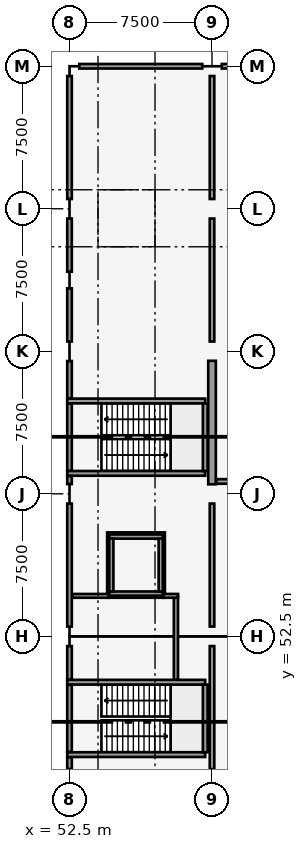
"""IFC4 building model, lengths in metres.
Left out: names, types, materials, properties, quantities, classifications, styles, units other than length and angle.
Written with IfcOpenShell. Run it as: python <this file> out.ifc"""

import sys

from ifc_helpers import new_model, si_unit, direction, frame, frame_2d, origin, origin_2d, place, context, subcontext, project, spatial, rectangle, extrude, element, fill, save


model = new_model("IFC4")
c1 = context("Model", 3, precision=1e-05, world=origin(), true_north=direction((0.0, 1.0)))
c2 = subcontext(c1, "Body", "Model", "MODEL_VIEW")
j1 = project(units=[si_unit("LENGTHUNIT", "METRE"), si_unit("PLANEANGLEUNIT", "RADIAN")], contexts=[c1])
p1 = place(None, origin())
s1 = spatial("IfcSite", under=j1, at=p1, CompositionType="ELEMENT")
p2 = place(p1, origin())
s2 = spatial("IfcBuilding", under=s1, at=p2, CompositionType="ELEMENT")
p3 = place(p2, frame((0.0, 0.0, -4.8)))
s3 = spatial("IfcBuildingStorey", under=s2, at=p3, CompositionType="ELEMENT", Elevation=-4.8)
for number, where, z_axis, x_axis in (
    (1, (52.5, 52.5, 0.0), (0.0, 0.0, 1.0), (1.0, 0.0, 0.0)),
    (2, (52.5, 60.0, 0.0), (0.0, 0.0, 1.0), (1.0, 0.0, 0.0)),
    (3, (52.5, 67.5, 0.0), (0.0, 0.0, 1.0), (1.0, 0.0, 0.0)),
    (4, (52.5, 75.0, 0.0), (0.0, 0.0, 1.0), (1.0, 0.0, 0.0)),
    (5, (52.5, 82.5, 0.0), (0.0, 0.0, 1.0), (1.0, 0.0, 0.0)),
    (6, (60.0, 52.5, 0.0), (0.0, 0.0, 1.0), (1.0, 0.0, 0.0)),
    (7, (60.0, 60.0, 0.0), (0.0, 0.0, 1.0), (1.0, 0.0, 0.0)),
    (8, (60.0, 67.5, 0.0), (0.0, 0.0, 1.0), (1.0, 0.0, 0.0)),
    (9, (60.0, 75.0, 0.0), (0.0, 0.0, 1.0), (1.0, 0.0, 0.0)),
    (10, (60.0, 82.5, 0.0), (0.0, 0.0, 1.0), (1.0, 0.0, 0.0)),
):
    element("IfcColumn", number, at=place(p3, frame(where, z_axis=z_axis, x_axis=x_axis)), inside=s3, PredefinedType="COLUMN", context=c2, shape_type="SweptSolid", body=[
        extrude(rectangle(XDim=1.0, YDim=1.0, at=origin_2d()), origin(), (0.0, 0.0, 1.0), 4.8),
    ])
p4 = place(p3, frame((52.5, 71.25, 0.0), z_axis=(0.0, 0.0, 1.0), x_axis=(1.0, 0.0, 0.0)))
e11 = element("IfcColumn", 11, at=p4, inside=s3, PredefinedType="PILASTER", context=c2, shape_type="SweptSolid", body=[
    extrude(rectangle(XDim=0.45, YDim=0.85, at=origin_2d()), origin(), (0.0, 0.0, 1.0), 4.8),
])
p5 = place(p3, frame((60.0, 60.5, 0.0), z_axis=(0.0, 0.0, 1.0), x_axis=(0.0, 1.0, 0.0)))
e12 = element("IfcWall", 12, at=p5, inside=s3, PredefinedType="SHEAR", context=c2, shape_type="SweptSolid", body=[
    extrude(rectangle(XDim=6.5, YDim=0.4, at=frame_2d((3.25, 0.0))), origin(), (0.0, 0.0, 1.0), 2.7),
])
p6 = place(p3, frame((52.38, 46.275, 0.0), z_axis=(0.0, 0.0, 1.0), x_axis=(1.0, 0.0, 0.0)))
e13 = element("IfcWall", 13, at=p6, inside=s3, PredefinedType="SOLIDWALL", context=c2, shape_type="SweptSolid", body=[
    extrude(rectangle(XDim=7.26, YDim=0.25, at=frame_2d((3.63, 0.0))), origin(), (0.0, 0.0, 1.0), 4.5),
])
p7 = place(p6, frame((0.62, 0.0, 0.0)))
e14 = element("IfcOpeningElement", 14, at=p7, cuts=e13, PredefinedType="OPENING", context=c2, shape_type="SweptSolid", body=[
    extrude(rectangle(XDim=1.1, YDim=2.15, at=frame_2d((0.55, 1.075))), frame((0.0, 0.135, 0.0), z_axis=(0.0, -1.0, 0.0), x_axis=(1.0, 0.0, 0.0)), (0.0, 0.0, 1.0), 0.27),
])
p8 = place(p3, frame((52.38, 50.085, 0.0), z_axis=(0.0, 0.0, 1.0), x_axis=(1.0, 0.0, 0.0)))
e15 = element("IfcWall", 15, at=p8, inside=s3, PredefinedType="SOLIDWALL", context=c2, shape_type="SweptSolid", body=[
    extrude(rectangle(XDim=7.26, YDim=0.25, at=frame_2d((3.63, 0.0))), origin(), (0.0, 0.0, 1.0), 4.5),
])
p9 = place(p8, frame((0.62, 0.0, 0.0)))
e16 = element("IfcOpeningElement", 16, at=p9, cuts=e15, PredefinedType="OPENING", context=c2, shape_type="SweptSolid", body=[
    extrude(rectangle(XDim=1.1, YDim=2.15, at=frame_2d((0.55, 1.075))), frame((0.0, 0.135, 0.0), z_axis=(0.0, -1.0, 0.0), x_axis=(1.0, 0.0, 0.0)), (0.0, 0.0, 1.0), 0.27),
])
p10 = place(p3, frame((59.645, 46.4, 0.0), z_axis=(0.0, 0.0, 1.0), x_axis=(0.0, 1.0, 0.0)))
e17 = element("IfcWall", 17, at=p10, inside=s3, PredefinedType="SOLIDWALL", context=c2, shape_type="SweptSolid", body=[
    extrude(rectangle(XDim=3.56, YDim=0.25, at=frame_2d((1.78, 0.0))), origin(), (0.0, 0.0, 1.0), 4.5),
])
p11 = place(p3, frame((52.38, 61.075, 0.0), z_axis=(0.0, 0.0, 1.0), x_axis=(1.0, 0.0, 0.0)))
e18 = element("IfcWall", 18, at=p11, inside=s3, PredefinedType="SOLIDWALL", context=c2, shape_type="SweptSolid", body=[
    extrude(rectangle(XDim=7.26, YDim=0.25, at=frame_2d((3.63, 0.0))), origin(), (0.0, 0.0, 1.0), 4.5),
])
p12 = place(p11, frame((0.62, 0.0, 0.0)))
e19 = element("IfcOpeningElement", 19, at=p12, cuts=e18, PredefinedType="OPENING", context=c2, shape_type="SweptSolid", body=[
    extrude(rectangle(XDim=1.1, YDim=2.15, at=frame_2d((0.55, 1.075))), frame((0.0, 0.135, 0.0), z_axis=(0.0, -1.0, 0.0), x_axis=(1.0, 0.0, 0.0)), (0.0, 0.0, 1.0), 0.27),
])
p13 = place(p3, frame((52.38, 64.885, 0.0), z_axis=(0.0, 0.0, 1.0), x_axis=(1.0, 0.0, 0.0)))
e20 = element("IfcWall", 20, at=p13, inside=s3, PredefinedType="SOLIDWALL", context=c2, shape_type="SweptSolid", body=[
    extrude(rectangle(XDim=7.26, YDim=0.25, at=frame_2d((3.63, 0.0))), origin(), (0.0, 0.0, 1.0), 4.5),
])
p14 = place(p13, frame((0.62, 0.0, 0.0)))
e21 = element("IfcOpeningElement", 21, at=p14, cuts=e20, PredefinedType="OPENING", context=c2, shape_type="SweptSolid", body=[
    extrude(rectangle(XDim=1.1, YDim=2.15, at=frame_2d((0.55, 1.075))), frame((0.0, 0.135, 0.0), z_axis=(0.0, -1.0, 0.0), x_axis=(1.0, 0.0, 0.0)), (0.0, 0.0, 1.0), 0.27),
])
p15 = place(p3, frame((59.645, 61.2, 0.0), z_axis=(0.0, 0.0, 1.0), x_axis=(0.0, 1.0, 0.0)))
e22 = element("IfcWall", 22, at=p15, inside=s3, PredefinedType="SOLIDWALL", context=c2, shape_type="SweptSolid", body=[
    extrude(rectangle(XDim=3.56, YDim=0.25, at=frame_2d((1.78, 0.0))), origin(), (0.0, 0.0, 1.0), 4.5),
])
p16 = place(p3, frame((54.59, 54.75, 0.0), z_axis=(0.0, 0.0, 1.0), x_axis=(1.0, 0.0, 0.0)))
e23 = element("IfcWall", 23, at=p16, inside=s3, PredefinedType="SOLIDWALL", context=c2, shape_type="SweptSolid", body=[
    extrude(rectangle(XDim=2.82, YDim=0.22, at=frame_2d((1.41, 0.0))), origin(), (0.0, 0.0, 1.0), 4.5),
])
p17 = place(p16, frame((0.86, 0.0, 0.0)))
e24 = element("IfcOpeningElement", 24, at=p17, cuts=e23, PredefinedType="OPENING", context=c2, shape_type="SweptSolid", body=[
    extrude(rectangle(XDim=1.1, YDim=2.15, at=frame_2d((0.55, 1.075))), frame((0.0, 0.12, 0.0), z_axis=(0.0, -1.0, 0.0), x_axis=(1.0, 0.0, 0.0)), (0.0, 0.0, 1.0), 0.24),
])
p18 = place(p3, frame((54.59, 57.75, 0.0), z_axis=(0.0, 0.0, 1.0), x_axis=(1.0, 0.0, 0.0)))
e25 = element("IfcWall", 25, at=p18, inside=s3, PredefinedType="SOLIDWALL", context=c2, shape_type="SweptSolid", body=[
    extrude(rectangle(XDim=2.82, YDim=0.22, at=frame_2d((1.41, 0.0))), origin(), (0.0, 0.0, 1.0), 4.5),
])
for number, where, z_axis, x_axis in (
    (26, (54.7, 54.86, 0.0), (0.0, 0.0, 1.0), (0.0, 1.0, 0.0)),
    (27, (57.3, 54.86, 0.0), (0.0, 0.0, 1.0), (0.0, 1.0, 0.0)),
):
    element("IfcWall", number, at=place(p3, frame(where, z_axis=z_axis, x_axis=x_axis)), inside=s3, PredefinedType="SOLIDWALL", context=c2, shape_type="SweptSolid", body=[
        extrude(rectangle(XDim=2.78, YDim=0.22, at=frame_2d((1.39, 0.0))), origin(), (0.0, 0.0, 1.0), 4.5),
    ])
p19 = place(p3, frame((58.1, 50.22, 0.0), z_axis=(0.0, 0.0, 1.0), x_axis=(0.0, 1.0, 0.0)))
e28 = element("IfcWall", 28, at=p19, inside=s3, PredefinedType="SOLIDWALL", context=c2, shape_type="SweptSolid", body=[
    extrude(rectangle(XDim=4.41, YDim=0.22, at=frame_2d((2.205, 0.0))), origin(), (0.0, 0.0, 1.0), 4.5),
])
p20 = place(p19, frame((0.45, 0.0, 0.0)))
e29 = element("IfcOpeningElement", 29, at=p20, cuts=e28, PredefinedType="OPENING", context=c2, shape_type="SweptSolid", body=[
    extrude(rectangle(XDim=1.1, YDim=2.15, at=frame_2d((0.55, 1.075))), frame((0.0, 0.12, 0.0), z_axis=(0.0, -1.0, 0.0), x_axis=(1.0, 0.0, 0.0)), (0.0, 0.0, 1.0), 0.24),
])
p21 = place(p3, frame((52.64, 54.63, 0.0), z_axis=(0.0, 0.0, 1.0), x_axis=(1.0, 0.0, 0.0)))
e30 = element("IfcWall", 30, at=p21, inside=s3, PredefinedType="PARTITIONING", context=c2, shape_type="SweptSolid", body=[
    extrude(rectangle(XDim=1.935, YDim=0.2, at=frame_2d((0.968, 0.0))), origin(), (0.0, 0.0, 1.0), 4.48),
])
p22 = place(p3, frame((57.425, 54.63, 0.0), z_axis=(0.0, 0.0, 1.0), x_axis=(1.0, 0.0, 0.0)))
e31 = element("IfcWall", 31, at=p22, inside=s3, PredefinedType="PARTITIONING", context=c2, shape_type="SweptSolid", body=[
    extrude(rectangle(XDim=0.785, YDim=0.2, at=frame_2d((0.393, 0.0))), origin(), (0.0, 0.0, 1.0), 4.48),
])
p23 = place(p3, frame((53.014, 82.5, 0.0), z_axis=(0.0, 0.0, 1.0), x_axis=(1.0, 0.0, 0.0)))
e32 = element("IfcWall", 32, at=p23, inside=s3, PredefinedType="PARTITIONING", context=c2, shape_type="SweptSolid", body=[
    extrude(rectangle(XDim=6.472, YDim=0.24, at=frame_2d((3.236, 0.0))), origin(), (0.0, 0.0, 1.0), 3.87),
])
p24 = place(p3, frame((60.514, 82.5, 0.0), z_axis=(0.0, 0.0, 1.0), x_axis=(1.0, 0.0, 0.0)))
e33 = element("IfcWall", 33, at=p24, inside=s3, PredefinedType="PARTITIONING", context=c2, shape_type="SweptSolid", body=[
    extrude(rectangle(XDim=6.522, YDim=0.24, at=frame_2d((3.261, 0.0))), origin(), (0.0, 0.0, 1.0), 3.87),
])
p25 = place(p3, frame((52.5, 45.514, 0.0), z_axis=(0.0, 0.0, 1.0), x_axis=(0.0, 1.0, 0.0)))
e34 = element("IfcWall", 34, at=p25, inside=s3, PredefinedType="PARTITIONING", context=c2, shape_type="SweptSolid", body=[
    extrude(rectangle(XDim=0.622, YDim=0.24, at=frame_2d((0.311, 0.0))), origin(), (0.0, 0.0, 1.0), 3.42),
])
p26 = place(p3, frame((52.5, 46.414, 0.0), z_axis=(0.0, 0.0, 1.0), x_axis=(0.0, 1.0, 0.0)))
e35 = element("IfcWall", 35, at=p26, inside=s3, PredefinedType="PARTITIONING", context=c2, shape_type="SweptSolid", body=[
    extrude(rectangle(XDim=3.532, YDim=0.24, at=frame_2d((1.766, 0.0))), origin(), (0.0, 0.0, 1.0), 3.87),
])
p27 = place(p3, frame((52.5, 50.224, 0.0), z_axis=(0.0, 0.0, 1.0), x_axis=(0.0, 1.0, 0.0)))
e36 = element("IfcWall", 36, at=p27, inside=s3, PredefinedType="PARTITIONING", context=c2, shape_type="SweptSolid", body=[
    extrude(rectangle(XDim=1.762, YDim=0.24, at=frame_2d((0.881, 0.0))), origin(), (0.0, 0.0, 1.0), 3.42),
])
p28 = place(p3, frame((52.5, 53.014, 0.0), z_axis=(0.0, 0.0, 1.0), x_axis=(0.0, 1.0, 0.0)))
e37 = element("IfcWall", 37, at=p28, inside=s3, PredefinedType="PARTITIONING", context=c2, shape_type="SweptSolid", body=[
    extrude(rectangle(XDim=6.472, YDim=0.24, at=frame_2d((3.236, 0.0))), origin(), (0.0, 0.0, 1.0), 3.42),
])
p29 = place(p3, frame((52.5, 60.514, 0.0), z_axis=(0.0, 0.0, 1.0), x_axis=(0.0, 1.0, 0.0)))
e38 = element("IfcWall", 38, at=p29, inside=s3, PredefinedType="PARTITIONING", context=c2, shape_type="SweptSolid", body=[
    extrude(rectangle(XDim=0.422, YDim=0.24, at=frame_2d((0.211, 0.0))), origin(), (0.0, 0.0, 1.0), 3.42),
])
p30 = place(p3, frame((52.5, 61.214, 0.0), z_axis=(0.0, 0.0, 1.0), x_axis=(0.0, 1.0, 0.0)))
e39 = element("IfcWall", 39, at=p30, inside=s3, PredefinedType="PARTITIONING", context=c2, shape_type="SweptSolid", body=[
    extrude(rectangle(XDim=3.532, YDim=0.24, at=frame_2d((1.766, 0.0))), origin(), (0.0, 0.0, 1.0), 3.87),
])
p31 = place(p3, frame((52.5, 65.024, 0.0), z_axis=(0.0, 0.0, 1.0), x_axis=(0.0, 1.0, 0.0)))
e40 = element("IfcWall", 40, at=p31, inside=s3, PredefinedType="PARTITIONING", context=c2, shape_type="SweptSolid", body=[
    extrude(rectangle(XDim=1.962, YDim=0.24, at=frame_2d((0.981, 0.0))), origin(), (0.0, 0.0, 1.0), 3.42),
])
for number, where, z_axis, x_axis in (
    (41, (52.5, 68.014, 0.0), (0.0, 0.0, 1.0), (0.0, 1.0, 0.0)),
    (42, (52.5, 71.689, 0.0), (0.0, 0.0, 1.0), (0.0, 1.0, 0.0)),
):
    element("IfcWall", number, at=place(p3, frame(where, z_axis=z_axis, x_axis=x_axis)), inside=s3, PredefinedType="PARTITIONING", context=c2, shape_type="SweptSolid", body=[
        extrude(rectangle(XDim=2.797, YDim=0.24, at=frame_2d((1.398, 0.0))), origin(), (0.0, 0.0, 1.0), 3.42),
    ])
p32 = place(p3, frame((52.5, 75.514, 0.0), z_axis=(0.0, 0.0, 1.0), x_axis=(0.0, 1.0, 0.0)))
e43 = element("IfcWall", 43, at=p32, inside=s3, PredefinedType="PARTITIONING", context=c2, shape_type="SweptSolid", body=[
    extrude(rectangle(XDim=6.472, YDim=0.24, at=frame_2d((3.236, 0.0))), origin(), (0.0, 0.0, 1.0), 3.42),
])
p33 = place(p3, frame((60.0, 45.514, 0.0), z_axis=(0.0, 0.0, 1.0), x_axis=(0.0, 1.0, 0.0)))
e44 = element("IfcWall", 44, at=p33, inside=s3, PredefinedType="PARTITIONING", context=c2, shape_type="SweptSolid", body=[
    extrude(rectangle(XDim=6.472, YDim=0.24, at=frame_2d((3.236, 0.0))), origin(), (0.0, 0.0, 1.0), 2.67),
])
p34 = place(p3, frame((60.0, 53.014, 0.0), z_axis=(0.0, 0.0, 1.0), x_axis=(0.0, 1.0, 0.0)))
e45 = element("IfcWall", 45, at=p34, inside=s3, PredefinedType="PARTITIONING", context=c2, shape_type="SweptSolid", body=[
    extrude(rectangle(XDim=6.472, YDim=0.24, at=frame_2d((3.236, 0.0))), origin(), (0.0, 0.0, 1.0), 2.67),
])
p35 = place(p34, frame((2.436, 0.0, 0.0)))
e46 = element("IfcOpeningElement", 46, at=p35, cuts=e45, PredefinedType="OPENING", context=c2, shape_type="SweptSolid", body=[
    extrude(rectangle(XDim=1.6, YDim=2.15, at=frame_2d((0.8, 1.075))), frame((0.0, 0.13, 0.0), z_axis=(0.0, -1.0, 0.0), x_axis=(1.0, 0.0, 0.0)), (0.0, 0.0, 1.0), 0.26),
])
p36 = place(p3, frame((60.0, 68.014, 0.0), z_axis=(0.0, 0.0, 1.0), x_axis=(0.0, 1.0, 0.0)))
e47 = element("IfcWall", 47, at=p36, inside=s3, PredefinedType="PARTITIONING", context=c2, shape_type="SweptSolid", body=[
    extrude(rectangle(XDim=6.472, YDim=0.24, at=frame_2d((3.236, 0.0))), origin(), (0.0, 0.0, 1.0), 2.67),
])
p37 = place(p36, frame((2.436, 0.0, 0.0)))
e48 = element("IfcOpeningElement", 48, at=p37, cuts=e47, PredefinedType="OPENING", context=c2, shape_type="SweptSolid", body=[
    extrude(rectangle(XDim=1.6, YDim=2.15, at=frame_2d((0.8, 1.075))), frame((0.0, 0.13, 0.0), z_axis=(0.0, -1.0, 0.0), x_axis=(1.0, 0.0, 0.0)), (0.0, 0.0, 1.0), 0.26),
])
p38 = place(p3, frame((60.0, 75.514, 0.0), z_axis=(0.0, 0.0, 1.0), x_axis=(0.0, 1.0, 0.0)))
e49 = element("IfcWall", 49, at=p38, inside=s3, PredefinedType="PARTITIONING", context=c2, shape_type="SweptSolid", body=[
    extrude(rectangle(XDim=6.472, YDim=0.24, at=frame_2d((3.236, 0.0))), origin(), (0.0, 0.0, 1.0), 3.42),
])
p39 = place(p3, frame((60.214, 60.65, 0.0), z_axis=(0.0, 0.0, 1.0), x_axis=(1.0, 0.0, 0.0)))
e50 = element("IfcWall", 50, at=p39, inside=s3, PredefinedType="PARTITIONING", context=c2, shape_type="SweptSolid", body=[
    extrude(rectangle(XDim=37.072, YDim=0.24, at=frame_2d((18.536, 0.0))), origin(), (0.0, 0.0, 1.0), 2.67),
])
p40 = place(p7, origin())
e51 = element("IfcDoor", 51, at=p40, inside=s3, OperationType="SINGLE_SWING_LEFT", PredefinedType="DOOR", context=c2, shape_type="SweptSolid", body=[
    extrude(rectangle(XDim=1.1, YDim=2.15, at=frame_2d((0.55, 1.075))), frame((0.0, 0.025, 0.0), z_axis=(0.0, -1.0, 0.0), x_axis=(1.0, 0.0, 0.0)), (0.0, 0.0, 1.0), 0.05),
])
fill(e14, e51)
p41 = place(p9, frame((1.1, 0.0, 0.0), z_axis=(0.0, 0.0, 1.0), x_axis=(-1.0, 0.0, 0.0)))
e52 = element("IfcDoor", 52, at=p41, inside=s3, OperationType="SINGLE_SWING_RIGHT", PredefinedType="DOOR", context=c2, shape_type="SweptSolid", body=[
    extrude(rectangle(XDim=1.1, YDim=2.15, at=frame_2d((0.55, 1.075))), frame((0.0, 0.025, 0.0), z_axis=(0.0, -1.0, 0.0), x_axis=(1.0, 0.0, 0.0)), (0.0, 0.0, 1.0), 0.05),
])
fill(e16, e52)
p42 = place(p12, origin())
e53 = element("IfcDoor", 53, at=p42, inside=s3, OperationType="SINGLE_SWING_LEFT", PredefinedType="DOOR", context=c2, shape_type="SweptSolid", body=[
    extrude(rectangle(XDim=1.1, YDim=2.15, at=frame_2d((0.55, 1.075))), frame((0.0, 0.025, 0.0), z_axis=(0.0, -1.0, 0.0), x_axis=(1.0, 0.0, 0.0)), (0.0, 0.0, 1.0), 0.05),
])
fill(e19, e53)
p43 = place(p14, frame((1.1, 0.0, 0.0), z_axis=(0.0, 0.0, 1.0), x_axis=(-1.0, 0.0, 0.0)))
e54 = element("IfcDoor", 54, at=p43, inside=s3, OperationType="SINGLE_SWING_RIGHT", PredefinedType="DOOR", context=c2, shape_type="SweptSolid", body=[
    extrude(rectangle(XDim=1.1, YDim=2.15, at=frame_2d((0.55, 1.075))), frame((0.0, 0.025, 0.0), z_axis=(0.0, -1.0, 0.0), x_axis=(1.0, 0.0, 0.0)), (0.0, 0.0, 1.0), 0.05),
])
fill(e21, e54)
p44 = place(p17, origin())
e55 = element("IfcDoor", 55, at=p44, inside=s3, OperationType="SLIDING_TO_LEFT", PredefinedType="DOOR", context=c2, shape_type="SweptSolid", body=[
    extrude(rectangle(XDim=1.1, YDim=2.15, at=frame_2d((0.55, 1.075))), frame((0.0, 0.025, 0.0), z_axis=(0.0, -1.0, 0.0), x_axis=(1.0, 0.0, 0.0)), (0.0, 0.0, 1.0), 0.05),
])
fill(e24, e55)
p45 = place(p20, origin())
e56 = element("IfcDoor", 56, at=p45, inside=s3, OperationType="SINGLE_SWING_LEFT", PredefinedType="DOOR", context=c2, shape_type="SweptSolid", body=[
    extrude(rectangle(XDim=1.1, YDim=2.15, at=frame_2d((0.55, 1.075))), frame((0.0, 0.025, 0.0), z_axis=(0.0, -1.0, 0.0), x_axis=(1.0, 0.0, 0.0)), (0.0, 0.0, 1.0), 0.05),
])
fill(e29, e56)
p46 = place(p35, origin())
e57 = element("IfcDoor", 57, at=p46, inside=s3, OperationType="SINGLE_SWING_RIGHT", PredefinedType="DOOR", context=c2, shape_type="SweptSolid", body=[
    extrude(rectangle(XDim=1.6, YDim=2.15, at=frame_2d((0.8, 1.075))), frame((0.0, 0.025, 0.0), z_axis=(0.0, -1.0, 0.0), x_axis=(1.0, 0.0, 0.0)), (0.0, 0.0, 1.0), 0.05),
])
fill(e46, e57)
p47 = place(p37, origin())
e58 = element("IfcDoor", 58, at=p47, inside=s3, OperationType="SINGLE_SWING_LEFT", PredefinedType="DOOR", context=c2, shape_type="SweptSolid", body=[
    extrude(rectangle(XDim=1.6, YDim=2.15, at=frame_2d((0.8, 1.075))), frame((0.0, 0.025, 0.0), z_axis=(0.0, -1.0, 0.0), x_axis=(1.0, 0.0, 0.0)), (0.0, 0.0, 1.0), 0.05),
])
fill(e48, e58)
save(model, sys.argv[1])
